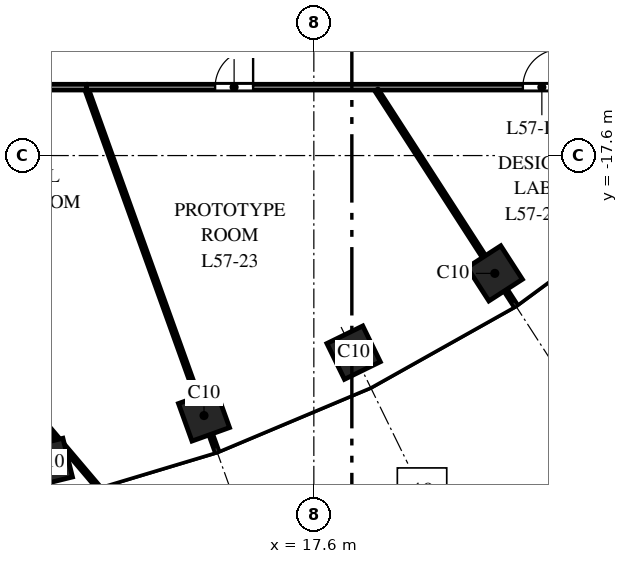
"""IFC4 building model, lengths in metres.
Left out: names, types, materials, properties, quantities, classifications, styles, units other than length and angle.
Written with IfcOpenShell. Run it as: python <this file> out.ifc"""

import sys

from ifc_helpers import new_model, si_unit, direction, frame, frame_2d, origin, origin_2d, place, context, subcontext, project, spatial, rectangle, extrude, element, fill, save


model = new_model("IFC4")
c1 = context("Model", 3, precision=1e-05, world=origin(), true_north=direction((0.0, 1.0)))
c2 = subcontext(c1, "Body", "Model", "MODEL_VIEW")
j1 = project(units=[si_unit("LENGTHUNIT", "METRE"), si_unit("PLANEANGLEUNIT", "RADIAN")], contexts=[c1])
p1 = place(None, origin())
s1 = spatial("IfcSite", under=j1, at=p1, CompositionType="ELEMENT")
p2 = place(p1, origin())
s2 = spatial("IfcBuilding", under=s1, at=p2, CompositionType="ELEMENT")
p3 = place(p2, frame((0.0, 0.0, 269.5)))
s3 = spatial("IfcBuildingStorey", under=s2, at=p3, CompositionType="ELEMENT", Elevation=269.5)
for number, where, z_axis, x_axis in (
    (1, (10.613, -25.674, 0.0), (0.0, 0.0, 1.0), (0.971, 0.24, 0.0)),
    (2, (14.709, -24.441, 0.0), (0.0, 0.0, 1.0), (0.941, 0.338, 0.0)),
    (3, (18.646, -22.785, 0.0), (0.0, 0.0, 1.0), (0.898, 0.439, 0.0)),
    (4, (22.362, -20.7, 0.0), (0.0, 0.0, 1.0), (0.84, 0.542, 0.0)),
):
    element("IfcColumn", number, at=place(p3, frame(where, z_axis=z_axis, x_axis=x_axis)), inside=s3, PredefinedType="COLUMN", context=c2, shape_type="SweptSolid", body=[
        extrude(rectangle(XDim=1.05, YDim=1.05, at=origin_2d()), origin(), (0.0, 0.0, 1.0), 4.0),
    ])
p4 = place(p3, frame((-1.107, -15.8, 0.0), z_axis=(0.0, 0.0, 1.0), x_axis=(1.0, 0.0, 0.0)))
e5 = element("IfcWall", 5, at=p4, inside=s3, PredefinedType="PARTITIONING", context=c2, shape_type="SweptSolid", body=[
    extrude(rectangle(XDim=12.762, YDim=0.15, at=frame_2d((6.381, 0.0))), origin(), (0.0, 0.0, 1.0), 2.85),
])
p5 = place(p4, frame((1.905, 0.0, 0.0)))
e6 = element("IfcOpeningElement", 6, at=p5, cuts=e5, PredefinedType="OPENING", context=c2, shape_type="SweptSolid", body=[
    extrude(rectangle(XDim=1.0, YDim=2.1, at=frame_2d((0.5, 1.05))), frame((0.0, 0.085, 0.0), z_axis=(0.0, -1.0, 0.0), x_axis=(1.0, 0.0, 0.0)), (0.0, 0.0, 1.0), 0.17),
])
p6 = place(p4, frame((8.016, 0.0, 0.0)))
e7 = element("IfcOpeningElement", 7, at=p6, cuts=e5, PredefinedType="OPENING", context=c2, shape_type="SweptSolid", body=[
    extrude(rectangle(XDim=1.0, YDim=2.1, at=frame_2d((0.5, 1.05))), frame((0.0, 0.085, 0.0), z_axis=(0.0, -1.0, 0.0), x_axis=(1.0, 0.0, 0.0)), (0.0, 0.0, 1.0), 0.17),
])
p7 = place(p3, frame((3.075, -15.878, 0.0), z_axis=(0.0, 0.0, 1.0), x_axis=(0.64645132614, -0.762955229966, 0.0)))
e8 = element("IfcWall", 8, at=p7, inside=s3, PredefinedType="PARTITIONING", context=c2, shape_type="SweptSolid", body=[
    extrude(rectangle(XDim=13.69, YDim=0.1, at=frame_2d((6.845, 0.0))), origin(), (0.0, 0.0, 1.0), 2.85),
])
p8 = place(p3, frame((11.629, -15.875, 0.0), z_axis=(0.0, 0.0, 1.0), x_axis=(0.338394316696, -0.94100440298, 0.0)))
e9 = element("IfcWall", 9, at=p8, inside=s3, PredefinedType="PARTITIONING", context=c2, shape_type="SweptSolid", body=[
    extrude(rectangle(XDim=10.104, YDim=0.1, at=frame_2d((5.052, 0.0))), origin(), (0.0, 0.0, 1.0), 2.85),
])
p9 = place(p3, frame((11.614, -15.8, 0.0), z_axis=(0.0, 0.0, 1.0), x_axis=(1.0, 0.0, 0.0)))
e10 = element("IfcWall", 10, at=p9, inside=s3, PredefinedType="PARTITIONING", context=c2, shape_type="SweptSolid", body=[
    extrude(rectangle(XDim=16.386, YDim=0.15, at=frame_2d((8.193, 0.0))), origin(), (0.0, 0.0, 1.0), 3.0),
])
p10 = place(p9, frame((3.388, 0.0, 0.0)))
e11 = element("IfcOpeningElement", 11, at=p10, cuts=e10, PredefinedType="OPENING", context=c2, shape_type="SweptSolid", body=[
    extrude(rectangle(XDim=1.0, YDim=2.1, at=frame_2d((0.5, 1.05))), frame((0.0, 0.085, 0.0), z_axis=(0.0, -1.0, 0.0), x_axis=(1.0, 0.0, 0.0)), (0.0, 0.0, 1.0), 0.17),
])
p11 = place(p9, frame((11.486, 0.0, 0.0)))
e12 = element("IfcOpeningElement", 12, at=p11, cuts=e10, PredefinedType="OPENING", context=c2, shape_type="SweptSolid", body=[
    extrude(rectangle(XDim=1.0, YDim=2.1, at=frame_2d((0.5, 1.05))), frame((0.0, 0.085, 0.0), z_axis=(0.0, -1.0, 0.0), x_axis=(1.0, 0.0, 0.0)), (0.0, 0.0, 1.0), 0.17),
])
p12 = place(p3, frame((19.248, -15.875, 0.0), z_axis=(0.0, 0.0, 1.0), x_axis=(0.542216737844, -0.840238662049, 0.0)))
e13 = element("IfcWall", 13, at=p12, inside=s3, PredefinedType="PARTITIONING", context=c2, shape_type="SweptSolid", body=[
    extrude(rectangle(XDim=6.744, YDim=0.1, at=frame_2d((3.372, 0.0))), origin(), (0.0, 0.0, 1.0), 3.7),
])
p13 = place(p10, origin())
e14 = element("IfcDoor", 14, at=p13, inside=s3, OperationType="SINGLE_SWING_RIGHT", PredefinedType="DOOR", context=c2, shape_type="SweptSolid", body=[
    extrude(rectangle(XDim=1.0, YDim=2.1, at=frame_2d((0.5, 1.05))), frame((0.0, 0.025, 0.0), z_axis=(0.0, -1.0, 0.0), x_axis=(1.0, 0.0, 0.0)), (0.0, 0.0, 1.0), 0.05),
])
fill(e11, e14)
p14 = place(p11, origin())
e15 = element("IfcDoor", 15, at=p14, inside=s3, OperationType="SINGLE_SWING_RIGHT", PredefinedType="DOOR", context=c2, shape_type="SweptSolid", body=[
    extrude(rectangle(XDim=1.0, YDim=2.1, at=frame_2d((0.5, 1.05))), frame((0.0, 0.025, 0.0), z_axis=(0.0, -1.0, 0.0), x_axis=(1.0, 0.0, 0.0)), (0.0, 0.0, 1.0), 0.05),
])
fill(e12, e15)
save(model, sys.argv[1])
